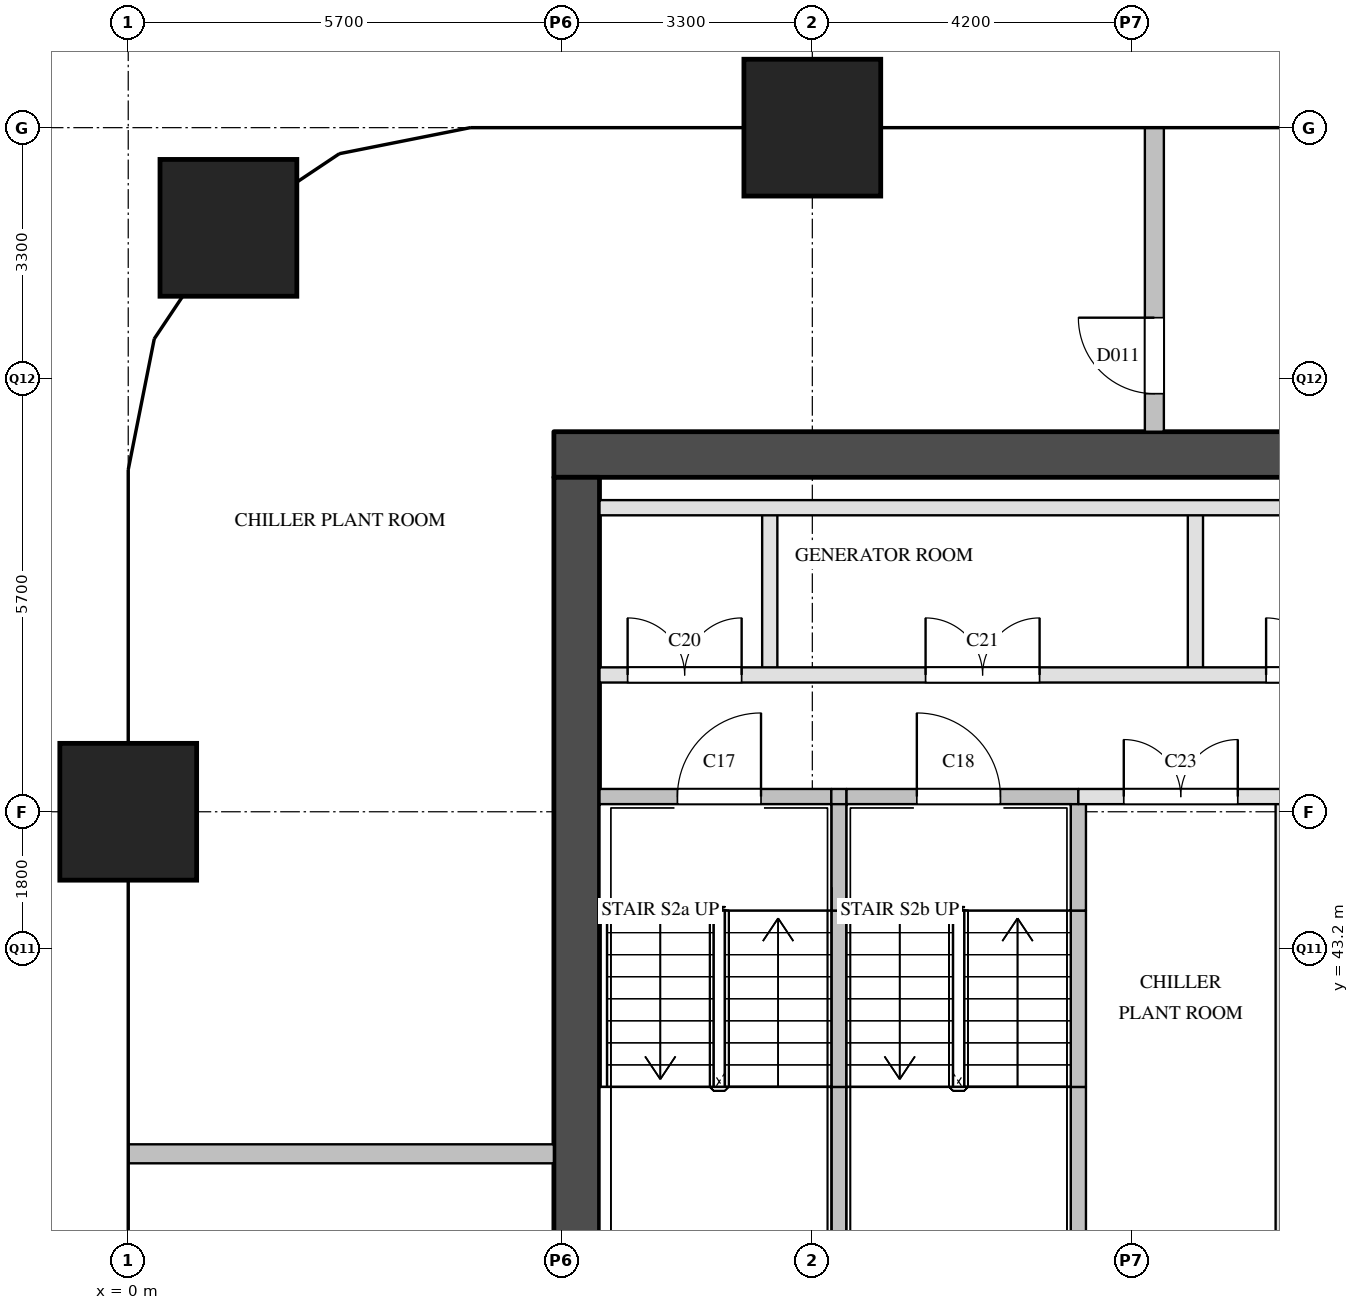
"""IFC4 building model, lengths in metres.
Left out: names, types, materials, properties, quantities, classifications, styles, units other than length and angle.
Written with IfcOpenShell. Run it as: python <this file> out.ifc"""

import sys

from ifc_helpers import new_model, si_unit, direction, frame, frame_2d, origin, origin_2d, place, context, subcontext, project, spatial, rectangle, extrude, element, fill, save


model = new_model("IFC4")
c1 = context("Model", 3, precision=1e-05, world=origin(), true_north=direction((0.0, 1.0)))
c2 = subcontext(c1, "Body", "Model", "MODEL_VIEW")
j1 = project(units=[si_unit("LENGTHUNIT", "METRE"), si_unit("PLANEANGLEUNIT", "RADIAN")], contexts=[c1])
p1 = place(None, origin())
s1 = spatial("IfcSite", under=j1, at=p1, CompositionType="ELEMENT")
p2 = place(p1, origin())
s2 = spatial("IfcBuilding", under=s1, at=p2, CompositionType="ELEMENT")
p3 = place(p2, frame((0.0, 0.0, 123.4)))
s3 = spatial("IfcBuildingStorey", under=s2, at=p3, CompositionType="ELEMENT", Elevation=123.4)
for number, where, z_axis, x_axis in (
    (1, (0.0, 45.0, 0.0), (0.0, 0.0, 1.0), (1.0, 0.0, 0.0)),
    (2, (1.318, 52.682, 0.0), (0.0, 0.0, 1.0), (1.0, 0.0, 0.0)),
    (3, (9.0, 54.0, 0.0), (0.0, 0.0, 1.0), (1.0, 0.0, 0.0)),
):
    element("IfcColumn", number, at=place(p3, frame(where, z_axis=z_axis, x_axis=x_axis)), inside=s3, PredefinedType="COLUMN", context=c2, shape_type="SweptSolid", body=[
        extrude(rectangle(XDim=1.8, YDim=1.8, at=origin_2d()), origin(), (0.0, 0.0, 1.0), 6.0),
    ])
p4 = place(p3, frame((5.6, 49.7, 0.0), z_axis=(0.0, 0.0, 1.0), x_axis=(1.0, 0.0, 0.0)))
e4 = element("IfcWall", 4, at=p4, inside=s3, PredefinedType="SHEAR", context=c2, shape_type="SweptSolid", body=[
    extrude(rectangle(XDim=12.4, YDim=0.6, at=frame_2d((6.2, 0.0))), origin(), (0.0, 0.0, 1.0), 5.7),
])
p5 = place(p3, frame((5.9, 29.1, 0.0), z_axis=(0.0, 0.0, 1.0), x_axis=(0.0, 1.0, 0.0)))
e5 = element("IfcWall", 5, at=p5, inside=s3, PredefinedType="SHEAR", context=c2, shape_type="SweptSolid", body=[
    extrude(rectangle(XDim=20.3, YDim=0.6, at=frame_2d((10.15, 0.0))), origin(), (0.0, 0.0, 1.0), 5.7),
])
p6 = place(p5, frame((3.6, 0.0, 0.0)))
e6 = element("IfcOpeningElement", 6, at=p6, cuts=e5, PredefinedType="OPENING", context=c2, shape_type="SweptSolid", body=[
    extrude(rectangle(XDim=1.8, YDim=2.1, at=frame_2d((0.9, 1.05))), frame((0.0, 0.31, 0.0), z_axis=(0.0, -1.0, 0.0), x_axis=(1.0, 0.0, 0.0)), (0.0, 0.0, 1.0), 0.62),
])
p7 = place(p3, frame((8.44, 46.8, 0.0), z_axis=(0.0, 0.0, 1.0), x_axis=(0.0, 1.0, 0.0)))
e7 = element("IfcWall", 7, at=p7, inside=s3, PredefinedType="PARTITIONING", context=c2, shape_type="SweptSolid", body=[
    extrude(rectangle(XDim=2.2, YDim=0.2, at=frame_2d((1.1, 0.0))), origin(), (0.0, 0.0, 1.0), 5.7),
])
p8 = place(p3, frame((9.35, 39.0, 0.0), z_axis=(0.0, 0.0, 1.0), x_axis=(0.0, 1.0, 0.0)))
e8 = element("IfcWall", 8, at=p8, inside=s3, PredefinedType="SOLIDWALL", context=c2, shape_type="SweptSolid", body=[
    extrude(rectangle(XDim=2.38, YDim=0.2, at=frame_2d((1.19, 0.0))), origin(), (0.0, 0.0, 1.0), 5.7),
])
p9 = place(p3, frame((9.35, 41.38, 0.0), z_axis=(0.0, 0.0, 1.0), x_axis=(0.0, 1.0, 0.0)))
e9 = element("IfcWall", 9, at=p9, inside=s3, PredefinedType="SOLIDWALL", context=c2, shape_type="SweptSolid", body=[
    extrude(rectangle(XDim=2.32, YDim=0.2, at=frame_2d((1.16, 0.0))), origin(), (0.0, 0.0, 1.0), 5.7),
])
p10 = place(p3, frame((9.35, 43.7, 0.0), z_axis=(0.0, 0.0, 1.0), x_axis=(0.0, 1.0, 0.0)))
e10 = element("IfcWall", 10, at=p10, inside=s3, PredefinedType="SOLIDWALL", context=c2, shape_type="SweptSolid", body=[
    extrude(rectangle(XDim=1.5, YDim=0.2, at=frame_2d((0.75, 0.0))), origin(), (0.0, 0.0, 1.0), 5.7),
])
p11 = place(p3, frame((12.5, 39.0, 0.0), z_axis=(0.0, 0.0, 1.0), x_axis=(0.0, 1.0, 0.0)))
e11 = element("IfcWall", 11, at=p11, inside=s3, PredefinedType="SOLIDWALL", context=c2, shape_type="SweptSolid", body=[
    extrude(rectangle(XDim=2.38, YDim=0.2, at=frame_2d((1.19, 0.0))), origin(), (0.0, 0.0, 1.0), 5.7),
])
p12 = place(p3, frame((12.5, 41.38, 0.0), z_axis=(0.0, 0.0, 1.0), x_axis=(0.0, 1.0, 0.0)))
e12 = element("IfcWall", 12, at=p12, inside=s3, PredefinedType="SOLIDWALL", context=c2, shape_type="SweptSolid", body=[
    extrude(rectangle(XDim=2.32, YDim=0.2, at=frame_2d((1.16, 0.0))), origin(), (0.0, 0.0, 1.0), 5.7),
])
p13 = place(p3, frame((12.5, 43.7, 0.0), z_axis=(0.0, 0.0, 1.0), x_axis=(0.0, 1.0, 0.0)))
e13 = element("IfcWall", 13, at=p13, inside=s3, PredefinedType="SOLIDWALL", context=c2, shape_type="SweptSolid", body=[
    extrude(rectangle(XDim=1.5, YDim=0.2, at=frame_2d((0.75, 0.0))), origin(), (0.0, 0.0, 1.0), 5.7),
])
p14 = place(p3, frame((14.04, 46.8, 0.0), z_axis=(0.0, 0.0, 1.0), x_axis=(0.0, 1.0, 0.0)))
e14 = element("IfcWall", 14, at=p14, inside=s3, PredefinedType="PARTITIONING", context=c2, shape_type="SweptSolid", body=[
    extrude(rectangle(XDim=2.2, YDim=0.2, at=frame_2d((1.1, 0.0))), origin(), (0.0, 0.0, 1.0), 5.7),
])
p15 = place(p3, frame((15.195, 39.0, 0.0), z_axis=(0.0, 0.0, 1.0), x_axis=(0.0, 1.0, 0.0)))
e15 = element("IfcWall", 15, at=p15, inside=s3, PredefinedType="PARTITIONING", context=c2, shape_type="SweptSolid", body=[
    extrude(rectangle(XDim=6.2, YDim=0.2, at=frame_2d((3.1, 0.0))), origin(), (0.0, 0.0, 1.0), 5.7),
])
p16 = place(p3, frame((12.5, 45.2, 0.0), z_axis=(0.0, 0.0, 1.0), x_axis=(1.0, 0.0, 0.0)))
e16 = element("IfcWall", 16, at=p16, inside=s3, PredefinedType="PARTITIONING", context=c2, shape_type="SweptSolid", body=[
    extrude(rectangle(XDim=4.9, YDim=0.2, at=frame_2d((2.45, 0.0))), origin(), (0.0, 0.0, 1.0), 5.7),
])
p17 = place(p16, frame((0.597, 0.0, 0.0)))
e17 = element("IfcOpeningElement", 17, at=p17, cuts=e16, PredefinedType="OPENING", context=c2, shape_type="SweptSolid", body=[
    extrude(rectangle(XDim=1.5, YDim=2.1, at=frame_2d((0.75, 1.05))), frame((0.0, 0.11, 0.0), z_axis=(0.0, -1.0, 0.0), x_axis=(1.0, 0.0, 0.0)), (0.0, 0.0, 1.0), 0.22),
])
p18 = place(p16, frame((3.048, 0.0, 0.0)))
e18 = element("IfcOpeningElement", 18, at=p18, cuts=e16, PredefinedType="OPENING", context=c2, shape_type="SweptSolid", body=[
    extrude(rectangle(XDim=1.5, YDim=2.1, at=frame_2d((0.75, 1.05))), frame((0.0, 0.11, 0.0), z_axis=(0.0, -1.0, 0.0), x_axis=(1.0, 0.0, 0.0)), (0.0, 0.0, 1.0), 0.22),
])
p19 = place(p3, frame((6.2, 45.2, 0.0), z_axis=(0.0, 0.0, 1.0), x_axis=(1.0, 0.0, 0.0)))
e19 = element("IfcWall", 19, at=p19, inside=s3, PredefinedType="SOLIDWALL", context=c2, shape_type="SweptSolid", body=[
    extrude(rectangle(XDim=3.05, YDim=0.2, at=frame_2d((1.525, 0.0))), origin(), (0.0, 0.0, 1.0), 5.7),
])
p20 = place(p19, frame((1.025, 0.0, 0.0)))
e20 = element("IfcOpeningElement", 20, at=p20, cuts=e19, PredefinedType="OPENING", context=c2, shape_type="SweptSolid", body=[
    extrude(rectangle(XDim=1.1, YDim=2.1, at=frame_2d((0.55, 1.05))), frame((0.0, 0.11, 0.0), z_axis=(0.0, -1.0, 0.0), x_axis=(1.0, 0.0, 0.0)), (0.0, 0.0, 1.0), 0.22),
])
p21 = place(p3, frame((9.25, 45.2, 0.0), z_axis=(0.0, 0.0, 1.0), x_axis=(1.0, 0.0, 0.0)))
e21 = element("IfcWall", 21, at=p21, inside=s3, PredefinedType="SOLIDWALL", context=c2, shape_type="SweptSolid", body=[
    extrude(rectangle(XDim=0.2, YDim=0.2, at=frame_2d((0.1, 0.0))), origin(), (0.0, 0.0, 1.0), 5.7),
])
p22 = place(p3, frame((9.45, 45.2, 0.0), z_axis=(0.0, 0.0, 1.0), x_axis=(1.0, 0.0, 0.0)))
e22 = element("IfcWall", 22, at=p22, inside=s3, PredefinedType="SOLIDWALL", context=c2, shape_type="SweptSolid", body=[
    extrude(rectangle(XDim=3.05, YDim=0.2, at=frame_2d((1.525, 0.0))), origin(), (0.0, 0.0, 1.0), 5.7),
])
p23 = place(p22, frame((0.925, 0.0, 0.0)))
e23 = element("IfcOpeningElement", 23, at=p23, cuts=e22, PredefinedType="OPENING", context=c2, shape_type="SweptSolid", body=[
    extrude(rectangle(XDim=1.1, YDim=2.1, at=frame_2d((0.55, 1.05))), frame((0.0, 0.11, 0.0), z_axis=(0.0, -1.0, 0.0), x_axis=(1.0, 0.0, 0.0)), (0.0, 0.0, 1.0), 0.22),
])
p24 = place(p3, frame((6.2, 46.8, 0.0), z_axis=(0.0, 0.0, 1.0), x_axis=(1.0, 0.0, 0.0)))
e24 = element("IfcWall", 24, at=p24, inside=s3, PredefinedType="PARTITIONING", context=c2, shape_type="SweptSolid", body=[
    extrude(rectangle(XDim=11.2, YDim=0.2, at=frame_2d((5.6, 0.0))), origin(), (0.0, 0.0, 1.0), 5.7),
])
p25 = place(p24, frame((0.37, 0.0, 0.0)))
e25 = element("IfcOpeningElement", 25, at=p25, cuts=e24, PredefinedType="OPENING", context=c2, shape_type="SweptSolid", body=[
    extrude(rectangle(XDim=1.5, YDim=2.1, at=frame_2d((0.75, 1.05))), frame((0.0, 0.11, 0.0), z_axis=(0.0, -1.0, 0.0), x_axis=(1.0, 0.0, 0.0)), (0.0, 0.0, 1.0), 0.22),
])
p26 = place(p24, frame((4.29, 0.0, 0.0)))
e26 = element("IfcOpeningElement", 26, at=p26, cuts=e24, PredefinedType="OPENING", context=c2, shape_type="SweptSolid", body=[
    extrude(rectangle(XDim=1.5, YDim=2.1, at=frame_2d((0.75, 1.05))), frame((0.0, 0.11, 0.0), z_axis=(0.0, -1.0, 0.0), x_axis=(1.0, 0.0, 0.0)), (0.0, 0.0, 1.0), 0.22),
])
p27 = place(p24, frame((8.77, 0.0, 0.0)))
e27 = element("IfcOpeningElement", 27, at=p27, cuts=e24, PredefinedType="OPENING", context=c2, shape_type="SweptSolid", body=[
    extrude(rectangle(XDim=1.5, YDim=2.1, at=frame_2d((0.75, 1.05))), frame((0.0, 0.11, 0.0), z_axis=(0.0, -1.0, 0.0), x_axis=(1.0, 0.0, 0.0)), (0.0, 0.0, 1.0), 0.22),
])
p28 = place(p3, frame((6.2, 49.0, 0.0), z_axis=(0.0, 0.0, 1.0), x_axis=(1.0, 0.0, 0.0)))
e28 = element("IfcWall", 28, at=p28, inside=s3, PredefinedType="PARTITIONING", context=c2, shape_type="SweptSolid", body=[
    extrude(rectangle(XDim=11.2, YDim=0.2, at=frame_2d((5.6, 0.0))), origin(), (0.0, 0.0, 1.0), 5.7),
])
p29 = place(p3, frame((0.0, 40.5, 0.0), z_axis=(0.0, 0.0, 1.0), x_axis=(1.0, 0.0, 0.0)))
e29 = element("IfcWall", 29, at=p29, inside=s3, PredefinedType="PARTITIONING", context=c2, shape_type="SweptSolid", body=[
    extrude(rectangle(XDim=5.6, YDim=0.25, at=frame_2d((2.8, 0.0))), origin(), (0.0, 0.0, 1.0), 5.7),
])
p30 = place(p3, frame((13.5, 50.0, 0.0), z_axis=(0.0, 0.0, 1.0), x_axis=(0.0, 1.0, 0.0)))
e30 = element("IfcWall", 30, at=p30, inside=s3, PredefinedType="PARTITIONING", context=c2, shape_type="SweptSolid", body=[
    extrude(rectangle(XDim=4.0, YDim=0.25, at=frame_2d((2.0, 0.0))), origin(), (0.0, 0.0, 1.0), 5.7),
])
p31 = place(p30, frame((0.5, 0.0, 0.0)))
e31 = element("IfcOpeningElement", 31, at=p31, cuts=e30, PredefinedType="OPENING", context=c2, shape_type="SweptSolid", body=[
    extrude(rectangle(XDim=1.0, YDim=2.1, at=frame_2d((0.5, 1.05))), frame((0.0, 0.135, 0.0), z_axis=(0.0, -1.0, 0.0), x_axis=(1.0, 0.0, 0.0)), (0.0, 0.0, 1.0), 0.27),
])
p32 = place(p20, origin())
e32 = element("IfcDoor", 32, at=p32, inside=s3, OperationType="SINGLE_SWING_RIGHT", PredefinedType="DOOR", context=c2, shape_type="SweptSolid", body=[
    extrude(rectangle(XDim=1.1, YDim=2.1, at=frame_2d((0.55, 1.05))), frame((0.0, 0.025, 0.0), z_axis=(0.0, -1.0, 0.0), x_axis=(1.0, 0.0, 0.0)), (0.0, 0.0, 1.0), 0.05),
])
fill(e20, e32)
p33 = place(p23, origin())
e33 = element("IfcDoor", 33, at=p33, inside=s3, OperationType="SINGLE_SWING_LEFT", PredefinedType="DOOR", context=c2, shape_type="SweptSolid", body=[
    extrude(rectangle(XDim=1.1, YDim=2.1, at=frame_2d((0.55, 1.05))), frame((0.0, 0.025, 0.0), z_axis=(0.0, -1.0, 0.0), x_axis=(1.0, 0.0, 0.0)), (0.0, 0.0, 1.0), 0.05),
])
fill(e23, e33)
p34 = place(p25, origin())
e34 = element("IfcDoor", 34, at=p34, inside=s3, OperationType="DOUBLE_DOOR_SINGLE_SWING", PredefinedType="DOOR", context=c2, shape_type="SweptSolid", body=[
    extrude(rectangle(XDim=1.5, YDim=2.1, at=frame_2d((0.75, 1.05))), frame((0.0, 0.025, 0.0), z_axis=(0.0, -1.0, 0.0), x_axis=(1.0, 0.0, 0.0)), (0.0, 0.0, 1.0), 0.05),
])
fill(e25, e34)
p35 = place(p26, origin())
e35 = element("IfcDoor", 35, at=p35, inside=s3, OperationType="DOUBLE_DOOR_SINGLE_SWING", PredefinedType="DOOR", context=c2, shape_type="SweptSolid", body=[
    extrude(rectangle(XDim=1.5, YDim=2.1, at=frame_2d((0.75, 1.05))), frame((0.0, 0.025, 0.0), z_axis=(0.0, -1.0, 0.0), x_axis=(1.0, 0.0, 0.0)), (0.0, 0.0, 1.0), 0.05),
])
fill(e26, e35)
p36 = place(p27, origin())
e36 = element("IfcDoor", 36, at=p36, inside=s3, OperationType="DOUBLE_DOOR_SINGLE_SWING", PredefinedType="DOOR", context=c2, shape_type="SweptSolid", body=[
    extrude(rectangle(XDim=1.5, YDim=2.1, at=frame_2d((0.75, 1.05))), frame((0.0, 0.025, 0.0), z_axis=(0.0, -1.0, 0.0), x_axis=(1.0, 0.0, 0.0)), (0.0, 0.0, 1.0), 0.05),
])
fill(e27, e36)
p37 = place(p17, origin())
e37 = element("IfcDoor", 37, at=p37, inside=s3, OperationType="DOUBLE_DOOR_SINGLE_SWING", PredefinedType="DOOR", context=c2, shape_type="SweptSolid", body=[
    extrude(rectangle(XDim=1.5, YDim=2.1, at=frame_2d((0.75, 1.05))), frame((0.0, 0.025, 0.0), z_axis=(0.0, -1.0, 0.0), x_axis=(1.0, 0.0, 0.0)), (0.0, 0.0, 1.0), 0.05),
])
fill(e17, e37)
p38 = place(p31, origin())
e38 = element("IfcDoor", 38, at=p38, inside=s3, OperationType="SINGLE_SWING_RIGHT", PredefinedType="DOOR", context=c2, shape_type="SweptSolid", body=[
    extrude(rectangle(XDim=1.0, YDim=2.1, at=frame_2d((0.5, 1.05))), frame((0.0, 0.025, 0.0), z_axis=(0.0, -1.0, 0.0), x_axis=(1.0, 0.0, 0.0)), (0.0, 0.0, 1.0), 0.05),
])
fill(e31, e38)
save(model, sys.argv[1])
